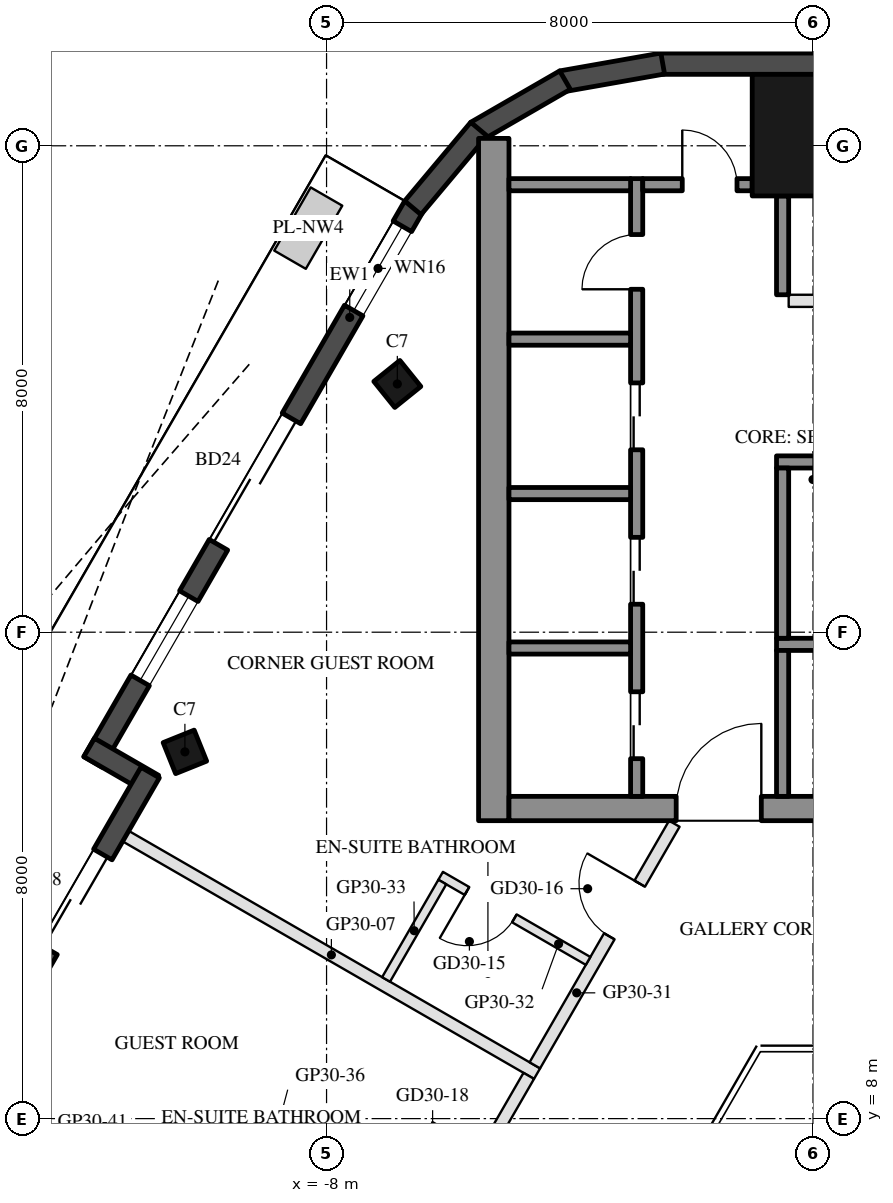
"""IFC4 building model, lengths in metres.
Left out: names, types, materials, properties, quantities, classifications, styles, units other than length and angle.
Written with IfcOpenShell. Run it as: python <this file> out.ifc"""

import sys

from ifc_helpers import new_model, si_unit, direction, frame, frame_2d, origin, origin_2d, place, context, subcontext, project, spatial, rectangle, hollow_rectangle, extrude, boolean, halfspace, element, fill, save


model = new_model("IFC4")
c1 = context("Model", 3, precision=1e-05, world=origin(), true_north=direction((0.0, 1.0)))
c2 = subcontext(c1, "Body", "Model", "MODEL_VIEW")
j1 = project(units=[si_unit("LENGTHUNIT", "METRE"), si_unit("PLANEANGLEUNIT", "RADIAN")], contexts=[c1])
p1 = place(None, origin())
s1 = spatial("IfcSite", under=j1, at=p1, CompositionType="ELEMENT")
p2 = place(p1, origin())
s2 = spatial("IfcBuilding", under=s1, at=p2, CompositionType="ELEMENT")
p3 = place(p2, frame((0.0, 0.0, 298.5)))
s3 = spatial("IfcBuildingStorey", under=s2, at=p3, CompositionType="ELEMENT", Elevation=298.5)
p4 = place(p3, frame((-6.836, 20.083, 0.0), z_axis=(0.069728397733, -0.180050765176, 0.981182792608), x_axis=(0.504246941598, 0.855030910201, 0.121066776982)))
e1 = element("IfcColumn", 1, at=p4, inside=s3, PredefinedType="COLUMN", context=c2, shape_type="SweptSolid", body=[
    boolean("DIFFERENCE", boolean("DIFFERENCE", extrude(hollow_rectangle(XDim=0.55, YDim=0.55, WallThickness=0.025, at=origin_2d()), origin(), (0.0, 0.0, 1.0), 3.771), halfspace(frame((0.0, 0.0, 0.04), z_axis=(0.0, 0.0, 1.0), x_axis=(1.0, 0.0, 0.0)), True)), halfspace(frame((0.0, 0.0, 3.731), z_axis=(0.0, 0.0, 1.0), x_axis=(1.0, 0.0, 0.0)), False)),
])
p5 = place(p3, frame((-10.33, 14.032, 0.0), z_axis=(0.100518021011, -0.128316722417, 0.98662604172), x_axis=(0.503129383785, 0.862065632243, 0.060857775822)))
e2 = element("IfcColumn", 2, at=p5, inside=s3, PredefinedType="COLUMN", context=c2, shape_type="SweptSolid", body=[
    boolean("DIFFERENCE", boolean("DIFFERENCE", extrude(hollow_rectangle(XDim=0.55, YDim=0.55, WallThickness=0.025, at=origin_2d()), origin(), (0.0, 0.0, 1.0), 3.75), halfspace(frame((0.0, 0.0, 0.034), z_axis=(0.0, 0.0, 1.0), x_axis=(1.0, 0.0, 0.0)), True)), halfspace(frame((0.0, 0.0, 3.716), z_axis=(0.0, 0.0, 1.0), x_axis=(1.0, 0.0, 0.0)), False)),
])
p6 = place(p3, frame((0.0, 24.175, 0.0), z_axis=(0.0, -0.21982618752, 0.975539054718), x_axis=(1.0, 0.0, 0.0)))
e3 = element("IfcColumn", 3, at=p6, inside=s3, PredefinedType="COLUMN", context=c2, shape_type="SweptSolid", body=[
    boolean("DIFFERENCE", boolean("DIFFERENCE", extrude(hollow_rectangle(XDim=2.0, YDim=2.0, WallThickness=0.05, at=origin_2d()), origin(), (0.0, 0.0, 1.0), 3.793), halfspace(frame((0.0, 0.0, 0.113), z_axis=(0.0, 0.0, 1.0), x_axis=(1.0, 0.0, 0.0)), True)), halfspace(frame((0.0, 0.0, 3.679), z_axis=(0.0, 0.0, 1.0), x_axis=(1.0, 0.0, 0.0)), False)),
])
p7 = place(p3, frame((-6.563, 23.005, 0.0), z_axis=(0.0, 0.0, 1.0), x_axis=(-0.500010118922, -0.866019561543, 0.0)))
e4 = element("IfcWall", 4, at=p7, inside=s3, PredefinedType="SOLIDWALL", context=c2, shape_type="SweptSolid", body=[
    extrude(rectangle(XDim=10.554, YDim=0.35, at=frame_2d((5.277, 0.0))), origin(), (0.0, 0.0, 1.0), 3.55),
])
p8 = place(p7, frame((0.38, 0.0, 0.3)))
e5 = element("IfcOpeningElement", 5, at=p8, cuts=e4, PredefinedType="OPENING", context=c2, shape_type="SweptSolid", body=[
    extrude(rectangle(XDim=1.6, YDim=2.65, at=frame_2d((0.8, 1.325))), frame((0.0, 0.185, 0.0), z_axis=(0.0, -1.0, 0.0), x_axis=(1.0, 0.0, 0.0)), (0.0, 0.0, 1.0), 0.37),
])
p9 = place(p7, frame((4.029, 0.0, 0.0)))
e6 = element("IfcOpeningElement", 6, at=p9, cuts=e4, PredefinedType="OPENING", context=c2, shape_type="SweptSolid", body=[
    extrude(rectangle(XDim=2.4, YDim=2.4, at=frame_2d((1.2, 1.2))), frame((0.0, 0.185, 0.0), z_axis=(0.0, -1.0, 0.0), x_axis=(1.0, 0.0, 0.0)), (0.0, 0.0, 1.0), 0.37),
])
p10 = place(p7, frame((7.404, 0.0, 0.3)))
e7 = element("IfcOpeningElement", 7, at=p10, cuts=e4, PredefinedType="OPENING", context=c2, shape_type="SweptSolid", body=[
    extrude(rectangle(XDim=1.6, YDim=2.65, at=frame_2d((0.8, 1.325))), frame((0.0, 0.185, 0.0), z_axis=(0.0, -1.0, 0.0), x_axis=(1.0, 0.0, 0.0)), (0.0, 0.0, 1.0), 0.37),
])
p11 = place(p3, frame((-11.905, 14.104, 0.0), z_axis=(0.0, 0.0, 1.0), x_axis=(0.866005645448, -0.500034220881, 0.0)))
e8 = element("IfcWall", 8, at=p11, inside=s3, PredefinedType="SOLIDWALL", context=c2, shape_type="SweptSolid", body=[
    extrude(rectangle(XDim=1.22, YDim=0.35, at=frame_2d((0.61, 0.0))), origin(), (0.0, 0.0, 1.0), 3.55),
])
p12 = place(p3, frame((-10.901, 13.692, 0.0), z_axis=(0.0, 0.0, 1.0), x_axis=(-0.499987198161, -0.866032794804, 0.0)))
e9 = element("IfcWall", 9, at=p12, inside=s3, PredefinedType="SOLIDWALL", context=c2, shape_type="SweptSolid", body=[
    extrude(rectangle(XDim=5.827, YDim=0.35, at=frame_2d((2.914, 0.0))), origin(), (0.0, 0.0, 1.0), 3.55),
])
p13 = place(p12, frame((1.557, 0.0, 0.0)))
e10 = element("IfcOpeningElement", 10, at=p13, cuts=e9, PredefinedType="OPENING", context=c2, shape_type="SweptSolid", body=[
    extrude(rectangle(XDim=1.8, YDim=2.4, at=frame_2d((0.9, 1.2))), frame((0.0, 0.185, 0.0), z_axis=(0.0, -1.0, 0.0), x_axis=(1.0, 0.0, 0.0)), (0.0, 0.0, 1.0), 0.37),
])
p14 = place(p12, frame((3.657, 0.0, 0.3)))
e11 = element("IfcOpeningElement", 11, at=p14, cuts=e9, PredefinedType="OPENING", context=c2, shape_type="SweptSolid", body=[
    extrude(rectangle(XDim=1.8, YDim=2.65, at=frame_2d((0.9, 1.325))), frame((0.0, 0.185, 0.0), z_axis=(0.0, -1.0, 0.0), x_axis=(1.0, 0.0, 0.0)), (0.0, 0.0, 1.0), 0.37),
])
p15 = place(p3, frame((2.502, 25.35, 0.0), z_axis=(0.0, 0.0, 1.0), x_axis=(-1.0, 0.0, 0.0)))
e12 = element("IfcWall", 12, at=p15, inside=s3, PredefinedType="SOLIDWALL", context=c2, shape_type="SweptSolid", body=[
    extrude(rectangle(XDim=5.004, YDim=0.35, at=frame_2d((2.502, 0.0))), origin(), (0.0, 0.0, 1.0), 3.55),
])
for number, where, z_axis, x_axis in (
    (13, (-2.472, 25.353, 0.0), (0.0, 0.0, 1.0), (-0.985, -0.174, 0.0)),
    (14, (-4.078, 25.08, 0.0), (0.0, 0.0, 1.0), (-0.866, -0.5, 0.0)),
    (15, (-5.495, 24.274, 0.0), (0.0, 0.0, 1.0), (-0.643, -0.766, 0.0)),
):
    element("IfcWall", number, at=place(p3, frame(where, z_axis=z_axis, x_axis=x_axis)), inside=s3, PredefinedType="SOLIDWALL", context=c2, shape_type="SweptSolid", body=[
        extrude(rectangle(XDim=1.689, YDim=0.35, at=frame_2d((0.845, 0.0))), origin(), (0.0, 0.0, 1.0), 3.55),
    ])
p16 = place(p3, frame((-5.25, 12.9, 0.0), z_axis=(0.0, 0.0, 1.0), x_axis=(0.0, 1.0, 0.0)))
e16 = element("IfcWall", 16, at=p16, inside=s3, PredefinedType="SHEAR", context=c2, shape_type="SweptSolid", body=[
    extrude(rectangle(XDim=11.222, YDim=0.5, at=frame_2d((5.611, 0.0))), origin(), (0.0, 0.0, 1.0), 3.5),
])
p17 = place(p3, frame((5.0, 13.1, 0.0), z_axis=(0.0, 0.0, 1.0), x_axis=(-1.0, 0.0, 0.0)))
e17 = element("IfcWall", 17, at=p17, inside=s3, PredefinedType="SHEAR", context=c2, shape_type="SweptSolid", body=[
    extrude(rectangle(XDim=10.0, YDim=0.4, at=frame_2d((5.0, 0.0))), origin(), (0.0, 0.0, 1.0), 3.5),
])
p18 = place(p17, frame((3.55, 0.0, 0.0)))
e18 = element("IfcOpeningElement", 18, at=p18, cuts=e17, PredefinedType="OPENING", context=c2, shape_type="SweptSolid", body=[
    extrude(rectangle(XDim=1.1, YDim=2.1, at=frame_2d((0.55, 1.05))), frame((0.0, 0.21, 0.0), z_axis=(0.0, -1.0, 0.0), x_axis=(1.0, 0.0, 0.0)), (0.0, 0.0, 1.0), 0.42),
])
p19 = place(p17, frame((5.85, 0.0, 0.0)))
e19 = element("IfcOpeningElement", 19, at=p19, cuts=e17, PredefinedType="OPENING", context=c2, shape_type="SweptSolid", body=[
    extrude(rectangle(XDim=1.4, YDim=2.1, at=frame_2d((0.7, 1.05))), frame((0.0, 0.21, 0.0), z_axis=(0.0, -1.0, 0.0), x_axis=(1.0, 0.0, 0.0)), (0.0, 0.0, 1.0), 0.42),
])
p20 = place(p3, frame((2.2, 18.8, 0.0), z_axis=(0.0, 0.0, 1.0), x_axis=(-1.0, 0.0, 0.0)))
e20 = element("IfcWall", 20, at=p20, inside=s3, PredefinedType="SHEAR", context=c2, shape_type="SweptSolid", body=[
    extrude(rectangle(XDim=2.8, YDim=0.2, at=frame_2d((1.4, 0.0))), origin(), (0.0, 0.0, 1.0), 3.5),
])
p21 = place(p3, frame((2.2, 15.8, 0.0), z_axis=(0.0, 0.0, 1.0), x_axis=(-1.0, 0.0, 0.0)))
e21 = element("IfcWall", 21, at=p21, inside=s3, PredefinedType="SHEAR", context=c2, shape_type="SweptSolid", body=[
    extrude(rectangle(XDim=2.8, YDim=0.2, at=frame_2d((1.4, 0.0))), origin(), (0.0, 0.0, 1.0), 3.5),
])
p22 = place(p21, frame((0.7, 0.0, 0.0)))
e22 = element("IfcOpeningElement", 22, at=p22, cuts=e21, PredefinedType="OPENING", context=c2, shape_type="SweptSolid", body=[
    extrude(rectangle(XDim=1.2, YDim=2.1, at=frame_2d((0.6, 1.05))), frame((0.0, 0.11, 0.0), z_axis=(0.0, -1.0, 0.0), x_axis=(1.0, 0.0, 0.0)), (0.0, 0.0, 1.0), 0.22),
])
p23 = place(p3, frame((-0.5, 15.9, 0.0), z_axis=(0.0, 0.0, 1.0), x_axis=(0.0, 1.0, 0.0)))
e23 = element("IfcWall", 23, at=p23, inside=s3, PredefinedType="SHEAR", context=c2, shape_type="SweptSolid", body=[
    extrude(rectangle(XDim=2.8, YDim=0.2, at=frame_2d((1.4, 0.0))), origin(), (0.0, 0.0, 1.0), 3.5),
])
p24 = place(p3, frame((-0.5, 13.3, 0.0), z_axis=(0.0, 0.0, 1.0), x_axis=(0.0, 1.0, 0.0)))
e24 = element("IfcWall", 24, at=p24, inside=s3, PredefinedType="SHEAR", context=c2, shape_type="SweptSolid", body=[
    extrude(rectangle(XDim=2.4, YDim=0.2, at=frame_2d((1.2, 0.0))), origin(), (0.0, 0.0, 1.0), 3.5),
])
p25 = place(p3, frame((-2.9, 13.3, 0.0), z_axis=(0.0, 0.0, 1.0), x_axis=(0.0, 1.0, 0.0)))
e25 = element("IfcWall", 25, at=p25, inside=s3, PredefinedType="SHEAR", context=c2, shape_type="SweptSolid", body=[
    extrude(rectangle(XDim=10.16, YDim=0.2, at=frame_2d((5.08, 0.0))), origin(), (0.0, 0.0, 1.0), 3.5),
])
p26 = place(p25, frame((0.62, 0.0, 0.0)))
e26 = element("IfcOpeningElement", 26, at=p26, cuts=e25, PredefinedType="OPENING", context=c2, shape_type="SweptSolid", body=[
    extrude(rectangle(XDim=1.1, YDim=2.1, at=frame_2d((0.55, 1.05))), frame((0.0, 0.11, 0.0), z_axis=(0.0, -1.0, 0.0), x_axis=(1.0, 0.0, 0.0)), (0.0, 0.0, 1.0), 0.22),
])
p27 = place(p25, frame((3.16, 0.0, 0.0)))
e27 = element("IfcOpeningElement", 27, at=p27, cuts=e25, PredefinedType="OPENING", context=c2, shape_type="SweptSolid", body=[
    extrude(rectangle(XDim=1.1, YDim=2.1, at=frame_2d((0.55, 1.05))), frame((0.0, 0.11, 0.0), z_axis=(0.0, -1.0, 0.0), x_axis=(1.0, 0.0, 0.0)), (0.0, 0.0, 1.0), 0.22),
])
p28 = place(p25, frame((5.7, 0.0, 0.0)))
e28 = element("IfcOpeningElement", 28, at=p28, cuts=e25, PredefinedType="OPENING", context=c2, shape_type="SweptSolid", body=[
    extrude(rectangle(XDim=1.1, YDim=2.1, at=frame_2d((0.55, 1.05))), frame((0.0, 0.11, 0.0), z_axis=(0.0, -1.0, 0.0), x_axis=(1.0, 0.0, 0.0)), (0.0, 0.0, 1.0), 0.22),
])
p29 = place(p25, frame((8.34, 0.0, 0.0)))
e29 = element("IfcOpeningElement", 29, at=p29, cuts=e25, PredefinedType="OPENING", context=c2, shape_type="SweptSolid", body=[
    extrude(rectangle(XDim=0.9, YDim=2.1, at=frame_2d((0.45, 1.05))), frame((0.0, 0.11, 0.0), z_axis=(0.0, -1.0, 0.0), x_axis=(1.0, 0.0, 0.0)), (0.0, 0.0, 1.0), 0.22),
])
p30 = place(p3, frame((-1.0, 23.36, 0.0), z_axis=(0.0, 0.0, 1.0), x_axis=(-1.0, 0.0, 0.0)))
e30 = element("IfcWall", 30, at=p30, inside=s3, PredefinedType="SHEAR", context=c2, shape_type="SweptSolid", body=[
    extrude(rectangle(XDim=1.8, YDim=0.2, at=frame_2d((0.9, 0.0))), origin(), (0.0, 0.0, 1.0), 3.5),
])
p31 = place(p30, frame((0.25, 0.0, 0.0)))
e31 = element("IfcOpeningElement", 31, at=p31, cuts=e30, PredefinedType="OPENING", context=c2, shape_type="SweptSolid", body=[
    extrude(rectangle(XDim=0.9, YDim=2.1, at=frame_2d((0.45, 1.05))), frame((0.0, 0.11, 0.0), z_axis=(0.0, -1.0, 0.0), x_axis=(1.0, 0.0, 0.0)), (0.0, 0.0, 1.0), 0.22),
])
p32 = place(p3, frame((-0.5, 21.55, 0.0), z_axis=(0.0, 0.0, 1.0), x_axis=(0.0, 1.0, 0.0)))
e32 = element("IfcWall", 32, at=p32, inside=s3, PredefinedType="SHEAR", context=c2, shape_type="SweptSolid", body=[
    extrude(rectangle(XDim=1.625, YDim=0.2, at=frame_2d((0.812, 0.0))), origin(), (0.0, 0.0, 1.0), 3.5),
])
for number, where, z_axis, x_axis in (
    (33, (-3.0, 15.74, 0.0), (0.0, 0.0, 1.0), (-1.0, 0.0, 0.0)),
    (34, (-3.0, 18.28, 0.0), (0.0, 0.0, 1.0), (-1.0, 0.0, 0.0)),
    (35, (-3.0, 20.82, 0.0), (0.0, 0.0, 1.0), (-1.0, 0.0, 0.0)),
    (36, (-3.0, 23.36, 0.0), (0.0, 0.0, 1.0), (-1.0, 0.0, 0.0)),
):
    element("IfcWall", number, at=place(p3, frame(where, z_axis=z_axis, x_axis=x_axis)), inside=s3, PredefinedType="SHEAR", context=c2, shape_type="SweptSolid", body=[
        extrude(rectangle(XDim=2.0, YDim=0.2, at=frame_2d((1.0, 0.0))), origin(), (0.0, 0.0, 1.0), 3.5),
    ])
p33 = place(p3, frame((5.0, 21.45, 0.0), z_axis=(0.0, 0.0, 1.0), x_axis=(-1.0, 0.0, 0.0)))
e37 = element("IfcWall", 37, at=p33, inside=s3, PredefinedType="PARTITIONING", context=c2, shape_type="SweptSolid", body=[
    extrude(rectangle(XDim=5.4, YDim=0.2, at=frame_2d((2.7, 0.0))), origin(), (0.0, 0.0, 1.0), 3.5),
])
p34 = place(p33, frame((2.9, 0.0, 0.0)))
e38 = element("IfcOpeningElement", 38, at=p34, cuts=e37, PredefinedType="OPENING", context=c2, shape_type="SweptSolid", body=[
    extrude(rectangle(XDim=0.9, YDim=2.1, at=frame_2d((0.45, 1.05))), frame((0.0, 0.11, 0.0), z_axis=(0.0, -1.0, 0.0), x_axis=(1.0, 0.0, 0.0)), (0.0, 0.0, 1.0), 0.22),
])
p35 = place(p3, frame((-11.303, 12.646, 0.0), z_axis=(0.0, 0.0, 1.0), x_axis=(0.866022678253, -0.500004720729, 0.0)))
e39 = element("IfcWall", 39, at=p35, inside=s3, PredefinedType="PARTITIONING", context=c2, shape_type="SweptSolid", body=[
    extrude(rectangle(XDim=7.812, YDim=0.2, at=frame_2d((3.906, 0.0))), origin(), (0.0, 0.0, 1.0), 3.1),
])
p36 = place(p3, frame((-4.575, 8.876, 0.0), z_axis=(0.0, 0.0, 1.0), x_axis=(0.50000187635, 0.866024320471, 0.0)))
e40 = element("IfcWall", 40, at=p36, inside=s3, PredefinedType="PARTITIONING", context=c2, shape_type="SweptSolid", body=[
    extrude(rectangle(XDim=4.588, YDim=0.2, at=frame_2d((2.294, 0.0))), origin(), (0.0, 0.0, 1.0), 3.1),
])
p37 = place(p36, frame((2.45, 0.0, 0.0)))
e41 = element("IfcOpeningElement", 41, at=p37, cuts=e40, PredefinedType="OPENING", context=c2, shape_type="SweptSolid", body=[
    extrude(rectangle(XDim=1.0, YDim=2.1, at=frame_2d((0.5, 1.05))), frame((0.0, 0.11, 0.0), z_axis=(0.0, -1.0, 0.0), x_axis=(1.0, 0.0, 0.0)), (0.0, 0.0, 1.0), 0.22),
])
p38 = place(p3, frame((-3.699, 10.594, 0.0), z_axis=(0.0, 0.0, 1.0), x_axis=(-0.865996816683, 0.500049511043, 0.0)))
e42 = element("IfcWall", 42, at=p38, inside=s3, PredefinedType="PARTITIONING", context=c2, shape_type="SweptSolid", body=[
    extrude(rectangle(XDim=2.8, YDim=0.15, at=frame_2d((1.4, 0.0))), origin(), (0.0, 0.0, 1.0), 3.55),
])
p39 = place(p38, frame((1.4, 0.0, 0.0)))
e43 = element("IfcOpeningElement", 43, at=p39, cuts=e42, PredefinedType="OPENING", context=c2, shape_type="SweptSolid", body=[
    extrude(rectangle(XDim=0.9, YDim=2.1, at=frame_2d((0.45, 1.05))), frame((0.0, 0.085, 0.0), z_axis=(0.0, -1.0, 0.0), x_axis=(1.0, 0.0, 0.0)), (0.0, 0.0, 1.0), 0.17),
])
p40 = place(p3, frame((-6.096, 11.891, 0.0), z_axis=(0.0, 0.0, 1.0), x_axis=(-0.49994333299, -0.866058118026, 0.0)))
e44 = element("IfcWall", 44, at=p40, inside=s3, PredefinedType="PARTITIONING", context=c2, shape_type="SweptSolid", body=[
    extrude(rectangle(XDim=1.85, YDim=0.15, at=frame_2d((0.925, 0.0))), origin(), (0.0, 0.0, 1.0), 3.1),
])
p41 = place(p3, frame((-7.123, 4.462, 0.0), z_axis=(0.0, 0.0, 1.0), x_axis=(0.499988551067, 0.866032013728, 0.0)))
e45 = element("IfcWall", 45, at=p41, inside=s3, PredefinedType="PARTITIONING", context=c2, shape_type="SweptSolid", body=[
    extrude(rectangle(XDim=4.897, YDim=0.2, at=frame_2d((2.449, 0.0))), origin(), (0.0, 0.0, 1.0), 3.1),
])
p42 = place(p41, frame((2.448, 0.0, 0.0)))
e46 = element("IfcOpeningElement", 46, at=p42, cuts=e45, PredefinedType="OPENING", context=c2, shape_type="SweptSolid", body=[
    extrude(rectangle(XDim=1.0, YDim=2.1, at=frame_2d((0.5, 1.05))), frame((0.0, 0.11, 0.0), z_axis=(0.0, -1.0, 0.0), x_axis=(1.0, 0.0, 0.0)), (0.0, 0.0, 1.0), 0.22),
])
p43 = place(p8, origin())
e47 = element("IfcWindow", 47, at=p43, inside=s3, PartitioningType="SINGLE_PANEL", PredefinedType="WINDOW", context=c2, shape_type="SweptSolid", body=[
    extrude(rectangle(XDim=1.6, YDim=2.65, at=frame_2d((0.8, 1.325))), frame((0.0, 0.03, 0.0), z_axis=(0.0, -1.0, 0.0), x_axis=(1.0, 0.0, 0.0)), (0.0, 0.0, 1.0), 0.06),
])
fill(e5, e47)
p44 = place(p9, frame((2.4, 0.0, 0.0), z_axis=(0.0, 0.0, 1.0), x_axis=(-1.0, 0.0, 0.0)))
e48 = element("IfcDoor", 48, at=p44, inside=s3, OperationType="SLIDING_TO_LEFT", PredefinedType="DOOR", context=c2, shape_type="SweptSolid", body=[
    extrude(rectangle(XDim=2.4, YDim=2.4, at=frame_2d((1.2, 1.2))), frame((0.0, 0.025, 0.0), z_axis=(0.0, -1.0, 0.0), x_axis=(1.0, 0.0, 0.0)), (0.0, 0.0, 1.0), 0.05),
])
fill(e6, e48)
p45 = place(p10, origin())
e49 = element("IfcWindow", 49, at=p45, inside=s3, PartitioningType="SINGLE_PANEL", PredefinedType="WINDOW", context=c2, shape_type="SweptSolid", body=[
    extrude(rectangle(XDim=1.6, YDim=2.65, at=frame_2d((0.8, 1.325))), frame((0.0, 0.03, 0.0), z_axis=(0.0, -1.0, 0.0), x_axis=(1.0, 0.0, 0.0)), (0.0, 0.0, 1.0), 0.06),
])
fill(e7, e49)
p46 = place(p13, frame((1.8, 0.0, 0.0), z_axis=(0.0, 0.0, 1.0), x_axis=(-1.0, 0.0, 0.0)))
e50 = element("IfcDoor", 50, at=p46, inside=s3, OperationType="SLIDING_TO_LEFT", PredefinedType="DOOR", context=c2, shape_type="SweptSolid", body=[
    extrude(rectangle(XDim=1.8, YDim=2.4, at=frame_2d((0.9, 1.2))), frame((0.0, 0.025, 0.0), z_axis=(0.0, -1.0, 0.0), x_axis=(1.0, 0.0, 0.0)), (0.0, 0.0, 1.0), 0.05),
])
fill(e10, e50)
p47 = place(p26, origin())
e51 = element("IfcDoor", 51, at=p47, inside=s3, OperationType="DOUBLE_DOOR_SLIDING", PredefinedType="DOOR", context=c2, shape_type="SweptSolid", body=[
    extrude(rectangle(XDim=1.1, YDim=2.1, at=frame_2d((0.55, 1.05))), frame((0.0, 0.025, 0.0), z_axis=(0.0, -1.0, 0.0), x_axis=(1.0, 0.0, 0.0)), (0.0, 0.0, 1.0), 0.05),
])
fill(e26, e51)
p48 = place(p27, origin())
e52 = element("IfcDoor", 52, at=p48, inside=s3, OperationType="DOUBLE_DOOR_SLIDING", PredefinedType="DOOR", context=c2, shape_type="SweptSolid", body=[
    extrude(rectangle(XDim=1.1, YDim=2.1, at=frame_2d((0.55, 1.05))), frame((0.0, 0.025, 0.0), z_axis=(0.0, -1.0, 0.0), x_axis=(1.0, 0.0, 0.0)), (0.0, 0.0, 1.0), 0.05),
])
fill(e27, e52)
p49 = place(p28, origin())
e53 = element("IfcDoor", 53, at=p49, inside=s3, OperationType="DOUBLE_DOOR_SLIDING", PredefinedType="DOOR", context=c2, shape_type="SweptSolid", body=[
    extrude(rectangle(XDim=1.1, YDim=2.1, at=frame_2d((0.55, 1.05))), frame((0.0, 0.025, 0.0), z_axis=(0.0, -1.0, 0.0), x_axis=(1.0, 0.0, 0.0)), (0.0, 0.0, 1.0), 0.05),
])
fill(e28, e53)
p50 = place(p29, origin())
e54 = element("IfcDoor", 54, at=p50, inside=s3, OperationType="SINGLE_SWING_LEFT", PredefinedType="DOOR", context=c2, shape_type="SweptSolid", body=[
    extrude(rectangle(XDim=0.9, YDim=2.1, at=frame_2d((0.45, 1.05))), frame((0.0, 0.025, 0.0), z_axis=(0.0, -1.0, 0.0), x_axis=(1.0, 0.0, 0.0)), (0.0, 0.0, 1.0), 0.05),
])
fill(e29, e54)
p51 = place(p31, frame((0.9, 0.0, 0.0), z_axis=(0.0, 0.0, 1.0), x_axis=(-1.0, 0.0, 0.0)))
e55 = element("IfcDoor", 55, at=p51, inside=s3, OperationType="SINGLE_SWING_LEFT", PredefinedType="DOOR", context=c2, shape_type="SweptSolid", body=[
    extrude(rectangle(XDim=0.9, YDim=2.1, at=frame_2d((0.45, 1.05))), frame((0.0, 0.025, 0.0), z_axis=(0.0, -1.0, 0.0), x_axis=(1.0, 0.0, 0.0)), (0.0, 0.0, 1.0), 0.05),
])
fill(e31, e55)
p52 = place(p19, frame((1.4, 0.0, 0.0), z_axis=(0.0, 0.0, 1.0), x_axis=(-1.0, 0.0, 0.0)))
e56 = element("IfcDoor", 56, at=p52, inside=s3, OperationType="DOUBLE_DOOR_SINGLE_SWING", PredefinedType="DOOR", context=c2, shape_type="SweptSolid", body=[
    extrude(rectangle(XDim=1.4, YDim=2.1, at=frame_2d((0.7, 1.05))), frame((0.0, 0.025, 0.0), z_axis=(0.0, -1.0, 0.0), x_axis=(1.0, 0.0, 0.0)), (0.0, 0.0, 1.0), 0.05),
])
fill(e19, e56)
p53 = place(p39, origin())
e57 = element("IfcDoor", 57, at=p53, inside=s3, OperationType="SINGLE_SWING_RIGHT", PredefinedType="DOOR", context=c2, shape_type="SweptSolid", body=[
    extrude(rectangle(XDim=0.9, YDim=2.1, at=frame_2d((0.45, 1.05))), frame((0.0, 0.025, 0.0), z_axis=(0.0, -1.0, 0.0), x_axis=(1.0, 0.0, 0.0)), (0.0, 0.0, 1.0), 0.05),
])
fill(e43, e57)
p54 = place(p37, origin())
e58 = element("IfcDoor", 58, at=p54, inside=s3, OperationType="SINGLE_SWING_RIGHT", PredefinedType="DOOR", context=c2, shape_type="SweptSolid", body=[
    extrude(rectangle(XDim=1.0, YDim=2.1, at=frame_2d((0.5, 1.05))), frame((0.0, 0.025, 0.0), z_axis=(0.0, -1.0, 0.0), x_axis=(1.0, 0.0, 0.0)), (0.0, 0.0, 1.0), 0.05),
])
fill(e41, e58)
save(model, sys.argv[1])
